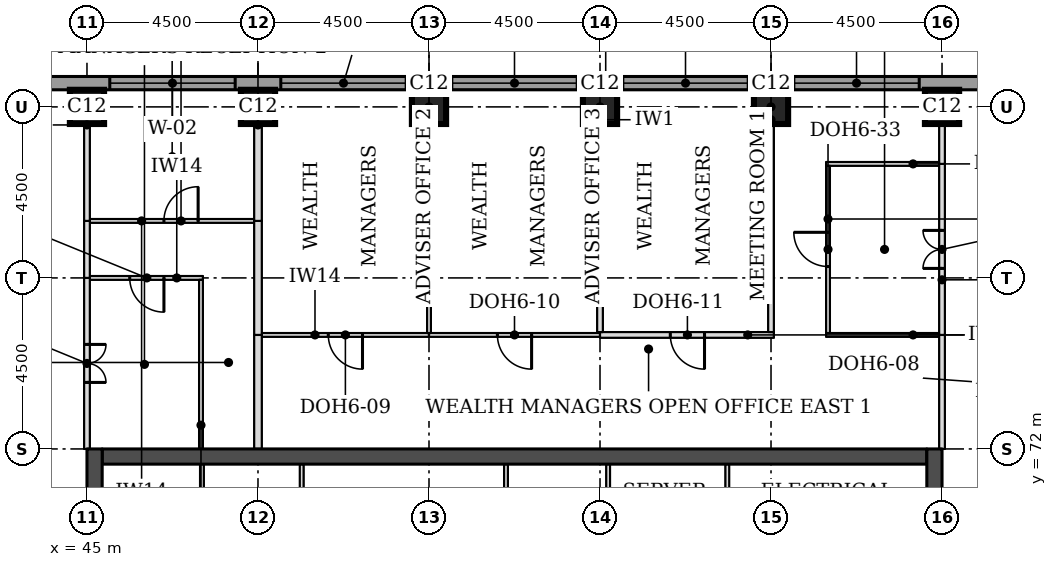
"""IFC4 building model, lengths in metres.
Left out: names, types, materials, properties, quantities, classifications, styles, units other than length and angle.
Written with IfcOpenShell. Run it as: python <this file> out.ifc"""

import sys

from ifc_helpers import new_model, si_unit, direction, frame, frame_2d, origin, origin_2d, place, context, subcontext, project, spatial, rectangle, extrude, element, fill, save


model = new_model("IFC4")
c1 = context("Model", 3, precision=1e-05, world=origin(), true_north=direction((0.0, 1.0)))
c2 = subcontext(c1, "Body", "Model", "MODEL_VIEW")
j1 = project(units=[si_unit("LENGTHUNIT", "METRE"), si_unit("PLANEANGLEUNIT", "RADIAN")], contexts=[c1])
p1 = place(None, origin())
s1 = spatial("IfcSite", under=j1, at=p1, CompositionType="ELEMENT")
p2 = place(p1, origin())
s2 = spatial("IfcBuilding", under=s1, at=p2, CompositionType="ELEMENT")
p3 = place(p2, frame((0.0, 0.0, 188.4)))
s3 = spatial("IfcBuildingStorey", under=s2, at=p3, CompositionType="ELEMENT", Elevation=188.4)
for number, where, z_axis, x_axis in (
    (1, (45.0, 81.0, 0.0), (0.0, 0.0, 1.0), (1.0, 0.0, 0.0)),
    (2, (49.5, 81.0, 0.0), (0.0, 0.0, 1.0), (1.0, 0.0, 0.0)),
    (3, (54.0, 81.0, 0.0), (0.0, 0.0, 1.0), (1.0, 0.0, 0.0)),
    (4, (58.5, 81.0, 0.0), (0.0, 0.0, 1.0), (1.0, 0.0, 0.0)),
    (5, (63.0, 81.0, 0.0), (0.0, 0.0, 1.0), (1.0, 0.0, 0.0)),
    (6, (67.5, 81.0, 0.0), (0.0, 0.0, 1.0), (1.0, 0.0, 0.0)),
):
    element("IfcColumn", number, at=place(p3, frame(where, z_axis=z_axis, x_axis=x_axis)), inside=s3, PredefinedType="COLUMN", context=c2, shape_type="SweptSolid", body=[
        extrude(rectangle(XDim=0.9, YDim=0.9, at=origin_2d()), origin(), (0.0, 0.0, 1.0), 3.7),
    ])
p4 = place(p3, frame((45.4, 71.8, 0.0), z_axis=(0.0, 0.0, 1.0), x_axis=(1.0, 0.0, 0.0)))
e7 = element("IfcWall", 7, at=p4, inside=s3, PredefinedType="SHEAR", context=c2, shape_type="SweptSolid", body=[
    extrude(rectangle(XDim=21.7, YDim=0.4, at=frame_2d((10.85, 0.0))), origin(), (0.0, 0.0, 1.0), 3.7),
])
p5 = place(p3, frame((45.2, 49.5, 0.0), z_axis=(0.0, 0.0, 1.0), x_axis=(0.0, 1.0, 0.0)))
e8 = element("IfcWall", 8, at=p5, inside=s3, PredefinedType="SHEAR", context=c2, shape_type="SweptSolid", body=[
    extrude(rectangle(XDim=22.5, YDim=0.4, at=frame_2d((11.25, 0.0))), origin(), (0.0, 0.0, 1.0), 3.7),
])
p6 = place(p5, frame((4.2, 0.0, 0.0)))
e9 = element("IfcOpeningElement", 9, at=p6, cuts=e8, PredefinedType="OPENING", context=c2, shape_type="SweptSolid", body=[
    extrude(rectangle(XDim=1.8, YDim=2.1, at=frame_2d((0.9, 1.05))), frame((0.0, 0.21, 0.0), z_axis=(0.0, -1.0, 0.0), x_axis=(1.0, 0.0, 0.0)), (0.0, 0.0, 1.0), 0.42),
])
p7 = place(p5, frame((6.9, 0.0, 0.0)))
e10 = element("IfcOpeningElement", 10, at=p7, cuts=e8, PredefinedType="OPENING", context=c2, shape_type="SweptSolid", body=[
    extrude(rectangle(XDim=1.1, YDim=2.1, at=frame_2d((0.55, 1.05))), frame((0.0, 0.21, 0.0), z_axis=(0.0, -1.0, 0.0), x_axis=(1.0, 0.0, 0.0)), (0.0, 0.0, 1.0), 0.42),
])
p8 = place(p5, frame((13.6, 0.0, 0.0)))
e11 = element("IfcOpeningElement", 11, at=p8, cuts=e8, PredefinedType="OPENING", context=c2, shape_type="SweptSolid", body=[
    extrude(rectangle(XDim=1.1, YDim=2.1, at=frame_2d((0.55, 1.05))), frame((0.0, 0.21, 0.0), z_axis=(0.0, -1.0, 0.0), x_axis=(1.0, 0.0, 0.0)), (0.0, 0.0, 1.0), 0.42),
])
p9 = place(p5, frame((16.5, 0.0, 0.0)))
e12 = element("IfcOpeningElement", 12, at=p9, cuts=e8, PredefinedType="OPENING", context=c2, shape_type="SweptSolid", body=[
    extrude(rectangle(XDim=1.8, YDim=2.1, at=frame_2d((0.9, 1.05))), frame((0.0, 0.21, 0.0), z_axis=(0.0, -1.0, 0.0), x_axis=(1.0, 0.0, 0.0)), (0.0, 0.0, 1.0), 0.42),
])
p10 = place(p3, frame((67.3, 49.5, 0.0), z_axis=(0.0, 0.0, 1.0), x_axis=(0.0, 1.0, 0.0)))
e13 = element("IfcWall", 13, at=p10, inside=s3, PredefinedType="SHEAR", context=c2, shape_type="SweptSolid", body=[
    extrude(rectangle(XDim=22.5, YDim=0.4, at=frame_2d((11.25, 0.0))), origin(), (0.0, 0.0, 1.0), 3.7),
])
p11 = place(p10, frame((4.2, 0.0, 0.0)))
e14 = element("IfcOpeningElement", 14, at=p11, cuts=e13, PredefinedType="OPENING", context=c2, shape_type="SweptSolid", body=[
    extrude(rectangle(XDim=1.8, YDim=2.1, at=frame_2d((0.9, 1.05))), frame((0.0, 0.21, 0.0), z_axis=(0.0, -1.0, 0.0), x_axis=(1.0, 0.0, 0.0)), (0.0, 0.0, 1.0), 0.42),
])
p12 = place(p10, frame((6.9, 0.0, 0.0)))
e15 = element("IfcOpeningElement", 15, at=p12, cuts=e13, PredefinedType="OPENING", context=c2, shape_type="SweptSolid", body=[
    extrude(rectangle(XDim=1.1, YDim=2.1, at=frame_2d((0.55, 1.05))), frame((0.0, 0.21, 0.0), z_axis=(0.0, -1.0, 0.0), x_axis=(1.0, 0.0, 0.0)), (0.0, 0.0, 1.0), 0.42),
])
p13 = place(p10, frame((13.6, 0.0, 0.0)))
e16 = element("IfcOpeningElement", 16, at=p13, cuts=e13, PredefinedType="OPENING", context=c2, shape_type="SweptSolid", body=[
    extrude(rectangle(XDim=1.1, YDim=2.1, at=frame_2d((0.55, 1.05))), frame((0.0, 0.21, 0.0), z_axis=(0.0, -1.0, 0.0), x_axis=(1.0, 0.0, 0.0)), (0.0, 0.0, 1.0), 0.42),
])
p14 = place(p10, frame((16.5, 0.0, 0.0)))
e17 = element("IfcOpeningElement", 17, at=p14, cuts=e13, PredefinedType="OPENING", context=c2, shape_type="SweptSolid", body=[
    extrude(rectangle(XDim=1.8, YDim=2.1, at=frame_2d((0.9, 1.05))), frame((0.0, 0.21, 0.0), z_axis=(0.0, -1.0, 0.0), x_axis=(1.0, 0.0, 0.0)), (0.0, 0.0, 1.0), 0.42),
])
p15 = place(p3, frame((72.331, 81.625, 0.0), z_axis=(0.0, 0.0, 1.0), x_axis=(-1.0, 0.0, 0.0)))
e18 = element("IfcWall", 18, at=p15, inside=s3, PredefinedType="STANDARD", context=c2, shape_type="SweptSolid", body=[
    extrude(rectangle(XDim=32.163, YDim=0.35, at=frame_2d((16.081, 0.0))), origin(), (0.0, 0.0, 1.0), 3.525),
])
p16 = place(p15, frame((5.431, 0.0, 0.9)))
e19 = element("IfcOpeningElement", 19, at=p16, cuts=e18, PredefinedType="OPENING", context=c2, shape_type="SweptSolid", body=[
    extrude(rectangle(XDim=3.3, YDim=1.9, at=frame_2d((1.65, 0.95))), frame((0.0, 0.185, 0.0), z_axis=(0.0, -1.0, 0.0), x_axis=(1.0, 0.0, 0.0)), (0.0, 0.0, 1.0), 0.37),
])
p17 = place(p15, frame((9.931, 0.0, 0.9)))
e20 = element("IfcOpeningElement", 20, at=p17, cuts=e18, PredefinedType="OPENING", context=c2, shape_type="SweptSolid", body=[
    extrude(rectangle(XDim=3.3, YDim=1.9, at=frame_2d((1.65, 0.95))), frame((0.0, 0.185, 0.0), z_axis=(0.0, -1.0, 0.0), x_axis=(1.0, 0.0, 0.0)), (0.0, 0.0, 1.0), 0.37),
])
p18 = place(p15, frame((14.431, 0.0, 0.9)))
e21 = element("IfcOpeningElement", 21, at=p18, cuts=e18, PredefinedType="OPENING", context=c2, shape_type="SweptSolid", body=[
    extrude(rectangle(XDim=3.3, YDim=1.9, at=frame_2d((1.65, 0.95))), frame((0.0, 0.185, 0.0), z_axis=(0.0, -1.0, 0.0), x_axis=(1.0, 0.0, 0.0)), (0.0, 0.0, 1.0), 0.37),
])
p19 = place(p15, frame((18.931, 0.0, 0.9)))
e22 = element("IfcOpeningElement", 22, at=p19, cuts=e18, PredefinedType="OPENING", context=c2, shape_type="SweptSolid", body=[
    extrude(rectangle(XDim=3.3, YDim=1.9, at=frame_2d((1.65, 0.95))), frame((0.0, 0.185, 0.0), z_axis=(0.0, -1.0, 0.0), x_axis=(1.0, 0.0, 0.0)), (0.0, 0.0, 1.0), 0.37),
])
p20 = place(p15, frame((23.431, 0.0, 0.9)))
e23 = element("IfcOpeningElement", 23, at=p20, cuts=e18, PredefinedType="OPENING", context=c2, shape_type="SweptSolid", body=[
    extrude(rectangle(XDim=3.3, YDim=1.9, at=frame_2d((1.65, 0.95))), frame((0.0, 0.185, 0.0), z_axis=(0.0, -1.0, 0.0), x_axis=(1.0, 0.0, 0.0)), (0.0, 0.0, 1.0), 0.37),
])
p21 = place(p3, frame((49.6, 75.0, 0.0), z_axis=(0.0, 0.0, 1.0), x_axis=(1.0, 0.0, 0.0)))
e24 = element("IfcWall", 24, at=p21, inside=s3, PredefinedType="PARTITIONING", context=c2, shape_type="SweptSolid", body=[
    extrude(rectangle(XDim=4.4, YDim=0.1, at=frame_2d((2.2, 0.0))), origin(), (0.0, 0.0, 1.0), 3.55),
])
p22 = place(p21, frame((1.75, 0.0, 0.0)))
e25 = element("IfcOpeningElement", 25, at=p22, cuts=e24, PredefinedType="OPENING", context=c2, shape_type="SweptSolid", body=[
    extrude(rectangle(XDim=0.9, YDim=2.1, at=frame_2d((0.45, 1.05))), frame((0.0, 0.06, 0.0), z_axis=(0.0, -1.0, 0.0), x_axis=(1.0, 0.0, 0.0)), (0.0, 0.0, 1.0), 0.12),
])
p23 = place(p3, frame((54.0, 75.0, 0.0), z_axis=(0.0, 0.0, 1.0), x_axis=(1.0, 0.0, 0.0)))
e26 = element("IfcWall", 26, at=p23, inside=s3, PredefinedType="PARTITIONING", context=c2, shape_type="SweptSolid", body=[
    extrude(rectangle(XDim=4.5, YDim=0.1, at=frame_2d((2.25, 0.0))), origin(), (0.0, 0.0, 1.0), 3.55),
])
p24 = place(p23, frame((1.8, 0.0, 0.0)))
e27 = element("IfcOpeningElement", 27, at=p24, cuts=e26, PredefinedType="OPENING", context=c2, shape_type="SweptSolid", body=[
    extrude(rectangle(XDim=0.9, YDim=2.1, at=frame_2d((0.45, 1.05))), frame((0.0, 0.06, 0.0), z_axis=(0.0, -1.0, 0.0), x_axis=(1.0, 0.0, 0.0)), (0.0, 0.0, 1.0), 0.12),
])
p25 = place(p3, frame((58.5, 75.0, 0.0), z_axis=(0.0, 0.0, 1.0), x_axis=(1.0, 0.0, 0.0)))
e28 = element("IfcWall", 28, at=p25, inside=s3, PredefinedType="PARTITIONING", context=c2, shape_type="SweptSolid", body=[
    extrude(rectangle(XDim=4.575, YDim=0.15, at=frame_2d((2.288, 0.0))), origin(), (0.0, 0.0, 1.0), 3.55),
])
p26 = place(p25, frame((1.85, 0.0, 0.0)))
e29 = element("IfcOpeningElement", 29, at=p26, cuts=e28, PredefinedType="OPENING", context=c2, shape_type="SweptSolid", body=[
    extrude(rectangle(XDim=0.9, YDim=2.1, at=frame_2d((0.45, 1.05))), frame((0.0, 0.085, 0.0), z_axis=(0.0, -1.0, 0.0), x_axis=(1.0, 0.0, 0.0)), (0.0, 0.0, 1.0), 0.17),
])
p27 = place(p3, frame((64.45, 75.0, 0.0), z_axis=(0.0, 0.0, 1.0), x_axis=(1.0, 0.0, 0.0)))
e30 = element("IfcWall", 30, at=p27, inside=s3, PredefinedType="PARTITIONING", context=c2, shape_type="SweptSolid", body=[
    extrude(rectangle(XDim=2.975, YDim=0.1, at=frame_2d((1.488, 0.0))), origin(), (0.0, 0.0, 1.0), 3.55),
])
p28 = place(p3, frame((45.075, 76.5, 0.0), z_axis=(0.0, 0.0, 1.0), x_axis=(1.0, 0.0, 0.0)))
e31 = element("IfcWall", 31, at=p28, inside=s3, PredefinedType="PARTITIONING", context=c2, shape_type="SweptSolid", body=[
    extrude(rectangle(XDim=2.975, YDim=0.1, at=frame_2d((1.488, 0.0))), origin(), (0.0, 0.0, 1.0), 3.55),
])
p29 = place(p28, frame((1.05, 0.0, 0.0)))
e32 = element("IfcOpeningElement", 32, at=p29, cuts=e31, PredefinedType="OPENING", context=c2, shape_type="SweptSolid", body=[
    extrude(rectangle(XDim=0.9, YDim=2.1, at=frame_2d((0.45, 1.05))), frame((0.0, 0.06, 0.0), z_axis=(0.0, -1.0, 0.0), x_axis=(1.0, 0.0, 0.0)), (0.0, 0.0, 1.0), 0.12),
])
p30 = place(p3, frame((45.075, 78.0, 0.0), z_axis=(0.0, 0.0, 1.0), x_axis=(1.0, 0.0, 0.0)))
e33 = element("IfcWall", 33, at=p30, inside=s3, PredefinedType="PARTITIONING", context=c2, shape_type="SweptSolid", body=[
    extrude(rectangle(XDim=4.325, YDim=0.1, at=frame_2d((2.163, 0.0))), origin(), (0.0, 0.0, 1.0), 3.55),
])
p31 = place(p30, frame((1.95, 0.0, 0.0)))
e34 = element("IfcOpeningElement", 34, at=p31, cuts=e33, PredefinedType="OPENING", context=c2, shape_type="SweptSolid", body=[
    extrude(rectangle(XDim=0.9, YDim=2.1, at=frame_2d((0.45, 1.05))), frame((0.0, 0.06, 0.0), z_axis=(0.0, -1.0, 0.0), x_axis=(1.0, 0.0, 0.0)), (0.0, 0.0, 1.0), 0.12),
])
p32 = place(p3, frame((64.45, 79.5, 0.0), z_axis=(0.0, 0.0, 1.0), x_axis=(1.0, 0.0, 0.0)))
e35 = element("IfcWall", 35, at=p32, inside=s3, PredefinedType="PARTITIONING", context=c2, shape_type="SweptSolid", body=[
    extrude(rectangle(XDim=2.975, YDim=0.1, at=frame_2d((1.488, 0.0))), origin(), (0.0, 0.0, 1.0), 3.55),
])
p33 = place(p3, frame((45.0, 72.0, 0.0), z_axis=(0.0, 0.0, 1.0), x_axis=(0.0, 1.0, 0.0)))
e36 = element("IfcWall", 36, at=p33, inside=s3, PredefinedType="PARTITIONING", context=c2, shape_type="SweptSolid", body=[
    extrude(rectangle(XDim=4.5, YDim=0.15, at=frame_2d((2.25, 0.0))), origin(), (0.0, 0.0, 1.0), 3.022),
])
p34 = place(p33, frame((1.75, 0.0, 0.0)))
e37 = element("IfcOpeningElement", 37, at=p34, cuts=e36, PredefinedType="OPENING", context=c2, shape_type="SweptSolid", body=[
    extrude(rectangle(XDim=1.0, YDim=2.1, at=frame_2d((0.5, 1.05))), frame((0.0, 0.085, 0.0), z_axis=(0.0, -1.0, 0.0), x_axis=(1.0, 0.0, 0.0)), (0.0, 0.0, 1.0), 0.17),
])
p35 = place(p3, frame((48.0, 72.0, 0.0), z_axis=(0.0, 0.0, 1.0), x_axis=(0.0, 1.0, 0.0)))
e38 = element("IfcWall", 38, at=p35, inside=s3, PredefinedType="PARTITIONING", context=c2, shape_type="SweptSolid", body=[
    extrude(rectangle(XDim=4.45, YDim=0.1, at=frame_2d((2.225, 0.0))), origin(), (0.0, 0.0, 1.0), 3.55),
])
p36 = place(p3, frame((49.5, 72.0, 0.0), z_axis=(0.0, 0.0, 1.0), x_axis=(0.0, 1.0, 0.0)))
e39 = element("IfcWall", 39, at=p36, inside=s3, PredefinedType="PARTITIONING", context=c2, shape_type="SweptSolid", body=[
    extrude(rectangle(XDim=3.0, YDim=0.2, at=frame_2d((1.5, 0.0))), origin(), (0.0, 0.0, 1.0), 3.55),
])
p37 = place(p3, frame((67.5, 72.0, 0.0), z_axis=(0.0, 0.0, 1.0), x_axis=(0.0, 1.0, 0.0)))
e40 = element("IfcWall", 40, at=p37, inside=s3, PredefinedType="PARTITIONING", context=c2, shape_type="SweptSolid", body=[
    extrude(rectangle(XDim=3.0, YDim=0.15, at=frame_2d((1.5, 0.0))), origin(), (0.0, 0.0, 1.0), 3.022),
])
p38 = place(p3, frame((49.5, 75.0, 0.0), z_axis=(0.0, 0.0, 1.0), x_axis=(0.0, 1.0, 0.0)))
e41 = element("IfcWall", 41, at=p38, inside=s3, PredefinedType="PARTITIONING", context=c2, shape_type="SweptSolid", body=[
    extrude(rectangle(XDim=3.0, YDim=0.2, at=frame_2d((1.5, 0.0))), origin(), (0.0, 0.0, 1.0), 3.55),
])
p39 = place(p3, frame((67.5, 75.0, 0.0), z_axis=(0.0, 0.0, 1.0), x_axis=(0.0, 1.0, 0.0)))
e42 = element("IfcWall", 42, at=p39, inside=s3, PredefinedType="PARTITIONING", context=c2, shape_type="SweptSolid", body=[
    extrude(rectangle(XDim=4.5, YDim=0.15, at=frame_2d((2.25, 0.0))), origin(), (0.0, 0.0, 1.0), 3.022),
])
p40 = place(p39, frame((1.75, 0.0, 0.0)))
e43 = element("IfcOpeningElement", 43, at=p40, cuts=e42, PredefinedType="OPENING", context=c2, shape_type="SweptSolid", body=[
    extrude(rectangle(XDim=1.0, YDim=2.1, at=frame_2d((0.5, 1.05))), frame((0.0, 0.085, 0.0), z_axis=(0.0, -1.0, 0.0), x_axis=(1.0, 0.0, 0.0)), (0.0, 0.0, 1.0), 0.17),
])
p41 = place(p3, frame((54.0, 75.05, 0.0), z_axis=(0.0, 0.0, 1.0), x_axis=(0.0, 1.0, 0.0)))
e44 = element("IfcWall", 44, at=p41, inside=s3, PredefinedType="PARTITIONING", context=c2, shape_type="SweptSolid", body=[
    extrude(rectangle(XDim=6.4, YDim=0.1, at=frame_2d((3.2, 0.0))), origin(), (0.0, 0.0, 1.0), 3.55),
])
p42 = place(p3, frame((64.5, 75.05, 0.0), z_axis=(0.0, 0.0, 1.0), x_axis=(0.0, 1.0, 0.0)))
e45 = element("IfcWall", 45, at=p42, inside=s3, PredefinedType="PARTITIONING", context=c2, shape_type="SweptSolid", body=[
    extrude(rectangle(XDim=4.4, YDim=0.1, at=frame_2d((2.2, 0.0))), origin(), (0.0, 0.0, 1.0), 3.55),
])
p43 = place(p42, frame((1.75, 0.0, 0.0)))
e46 = element("IfcOpeningElement", 46, at=p43, cuts=e45, PredefinedType="OPENING", context=c2, shape_type="SweptSolid", body=[
    extrude(rectangle(XDim=0.9, YDim=2.1, at=frame_2d((0.45, 1.05))), frame((0.0, 0.06, 0.0), z_axis=(0.0, -1.0, 0.0), x_axis=(1.0, 0.0, 0.0)), (0.0, 0.0, 1.0), 0.12),
])
for number, where, z_axis, x_axis in (
    (47, (58.5, 75.075, 0.0), (0.0, 0.0, 1.0), (0.0, 1.0, 0.0)),
    (48, (63.0, 75.075, 0.0), (0.0, 0.0, 1.0), (0.0, 1.0, 0.0)),
):
    element("IfcWall", number, at=place(p3, frame(where, z_axis=z_axis, x_axis=x_axis)), inside=s3, PredefinedType="PARTITIONING", context=c2, shape_type="SweptSolid", body=[
        extrude(rectangle(XDim=6.375, YDim=0.15, at=frame_2d((3.188, 0.0))), origin(), (0.0, 0.0, 1.0), 3.55),
    ])
p44 = place(p3, frame((45.0, 76.5, 0.0), z_axis=(0.0, 0.0, 1.0), x_axis=(0.0, 1.0, 0.0)))
e49 = element("IfcWall", 49, at=p44, inside=s3, PredefinedType="PARTITIONING", context=c2, shape_type="SweptSolid", body=[
    extrude(rectangle(XDim=1.5, YDim=0.15, at=frame_2d((0.75, 0.0))), origin(), (0.0, 0.0, 1.0), 3.022),
])
p45 = place(p3, frame((45.0, 78.0, 0.0), z_axis=(0.0, 0.0, 1.0), x_axis=(0.0, 1.0, 0.0)))
e50 = element("IfcWall", 50, at=p45, inside=s3, PredefinedType="PARTITIONING", context=c2, shape_type="SweptSolid", body=[
    extrude(rectangle(XDim=3.45, YDim=0.15, at=frame_2d((1.725, 0.0))), origin(), (0.0, 0.0, 1.0), 3.022),
])
p46 = place(p3, frame((49.5, 78.0, 0.0), z_axis=(0.0, 0.0, 1.0), x_axis=(0.0, 1.0, 0.0)))
e51 = element("IfcWall", 51, at=p46, inside=s3, PredefinedType="PARTITIONING", context=c2, shape_type="SweptSolid", body=[
    extrude(rectangle(XDim=3.45, YDim=0.2, at=frame_2d((1.725, 0.0))), origin(), (0.0, 0.0, 1.0), 3.55),
])
p47 = place(p3, frame((67.5, 79.5, 0.0), z_axis=(0.0, 0.0, 1.0), x_axis=(0.0, 1.0, 0.0)))
e52 = element("IfcWall", 52, at=p47, inside=s3, PredefinedType="PARTITIONING", context=c2, shape_type="SweptSolid", body=[
    extrude(rectangle(XDim=1.95, YDim=0.15, at=frame_2d((0.975, 0.0))), origin(), (0.0, 0.0, 1.0), 3.022),
])
for number, where, z_axis, x_axis in (
    (53, (48.025, 68.5, 0.0), (0.0, 0.0, 1.0), (0.0, 1.0, 0.0)),
    (54, (50.65, 68.5, 0.0), (0.0, 0.0, 1.0), (0.0, 1.0, 0.0)),
    (55, (56.026, 68.5, 0.0), (0.0, 0.0, 1.0), (0.0, 1.0, 0.0)),
    (56, (58.714, 68.5, 0.0), (0.0, 0.0, 1.0), (0.0, 1.0, 0.0)),
    (57, (61.85, 68.5, 0.0), (0.0, 0.0, 1.0), (0.0, 1.0, 0.0)),
):
    element("IfcWall", number, at=place(p3, frame(where, z_axis=z_axis, x_axis=x_axis)), inside=s3, PredefinedType="PARTITIONING", context=c2, shape_type="SweptSolid", body=[
        extrude(rectangle(XDim=3.1, YDim=0.1, at=frame_2d((1.55, 0.0))), origin(), (0.0, 0.0, 1.0), 3.55),
    ])
p48 = place(p16, origin())
e58 = element("IfcWindow", 58, at=p48, inside=s3, PartitioningType="SINGLE_PANEL", PredefinedType="WINDOW", context=c2, shape_type="SweptSolid", body=[
    extrude(rectangle(XDim=3.3, YDim=1.9, at=frame_2d((1.65, 0.95))), frame((0.0, 0.085, 0.0), z_axis=(0.0, -1.0, 0.0), x_axis=(1.0, 0.0, 0.0)), (0.0, 0.0, 1.0), 0.06),
])
fill(e19, e58)
p49 = place(p17, origin())
e59 = element("IfcWindow", 59, at=p49, inside=s3, PartitioningType="SINGLE_PANEL", PredefinedType="WINDOW", context=c2, shape_type="SweptSolid", body=[
    extrude(rectangle(XDim=3.3, YDim=1.9, at=frame_2d((1.65, 0.95))), frame((0.0, 0.085, 0.0), z_axis=(0.0, -1.0, 0.0), x_axis=(1.0, 0.0, 0.0)), (0.0, 0.0, 1.0), 0.06),
])
fill(e20, e59)
p50 = place(p18, origin())
e60 = element("IfcWindow", 60, at=p50, inside=s3, PartitioningType="SINGLE_PANEL", PredefinedType="WINDOW", context=c2, shape_type="SweptSolid", body=[
    extrude(rectangle(XDim=3.3, YDim=1.9, at=frame_2d((1.65, 0.95))), frame((0.0, 0.085, 0.0), z_axis=(0.0, -1.0, 0.0), x_axis=(1.0, 0.0, 0.0)), (0.0, 0.0, 1.0), 0.06),
])
fill(e21, e60)
p51 = place(p19, origin())
e61 = element("IfcWindow", 61, at=p51, inside=s3, PartitioningType="SINGLE_PANEL", PredefinedType="WINDOW", context=c2, shape_type="SweptSolid", body=[
    extrude(rectangle(XDim=3.3, YDim=1.9, at=frame_2d((1.65, 0.95))), frame((0.0, 0.085, 0.0), z_axis=(0.0, -1.0, 0.0), x_axis=(1.0, 0.0, 0.0)), (0.0, 0.0, 1.0), 0.06),
])
fill(e22, e61)
p52 = place(p20, origin())
e62 = element("IfcWindow", 62, at=p52, inside=s3, PartitioningType="SINGLE_PANEL", PredefinedType="WINDOW", context=c2, shape_type="SweptSolid", body=[
    extrude(rectangle(XDim=3.3, YDim=1.9, at=frame_2d((1.65, 0.95))), frame((0.0, 0.085, 0.0), z_axis=(0.0, -1.0, 0.0), x_axis=(1.0, 0.0, 0.0)), (0.0, 0.0, 1.0), 0.06),
])
fill(e23, e62)
p53 = place(p34, frame((1.0, 0.0, 0.0), z_axis=(0.0, 0.0, 1.0), x_axis=(-1.0, 0.0, 0.0)))
e63 = element("IfcDoor", 63, at=p53, inside=s3, OperationType="DOUBLE_DOOR_SINGLE_SWING", PredefinedType="DOOR", context=c2, shape_type="SweptSolid", body=[
    extrude(rectangle(XDim=1.0, YDim=2.1, at=frame_2d((0.5, 1.05))), frame((0.0, 0.025, 0.0), z_axis=(0.0, -1.0, 0.0), x_axis=(1.0, 0.0, 0.0)), (0.0, 0.0, 1.0), 0.05),
])
fill(e37, e63)
p54 = place(p29, frame((0.9, 0.0, 0.0), z_axis=(0.0, 0.0, 1.0), x_axis=(-1.0, 0.0, 0.0)))
e64 = element("IfcDoor", 64, at=p54, inside=s3, OperationType="SINGLE_SWING_LEFT", PredefinedType="DOOR", context=c2, shape_type="SweptSolid", body=[
    extrude(rectangle(XDim=0.9, YDim=2.1, at=frame_2d((0.45, 1.05))), frame((0.0, 0.025, 0.0), z_axis=(0.0, -1.0, 0.0), x_axis=(1.0, 0.0, 0.0)), (0.0, 0.0, 1.0), 0.05),
])
fill(e32, e64)
p55 = place(p31, origin())
e65 = element("IfcDoor", 65, at=p55, inside=s3, OperationType="SINGLE_SWING_RIGHT", PredefinedType="DOOR", context=c2, shape_type="SweptSolid", body=[
    extrude(rectangle(XDim=0.9, YDim=2.1, at=frame_2d((0.45, 1.05))), frame((0.0, 0.025, 0.0), z_axis=(0.0, -1.0, 0.0), x_axis=(1.0, 0.0, 0.0)), (0.0, 0.0, 1.0), 0.05),
])
fill(e34, e65)
p56 = place(p40, origin())
e66 = element("IfcDoor", 66, at=p56, inside=s3, OperationType="DOUBLE_DOOR_SINGLE_SWING", PredefinedType="DOOR", context=c2, shape_type="SweptSolid", body=[
    extrude(rectangle(XDim=1.0, YDim=2.1, at=frame_2d((0.5, 1.05))), frame((0.0, 0.025, 0.0), z_axis=(0.0, -1.0, 0.0), x_axis=(1.0, 0.0, 0.0)), (0.0, 0.0, 1.0), 0.05),
])
fill(e43, e66)
p57 = place(p43, origin())
e67 = element("IfcDoor", 67, at=p57, inside=s3, OperationType="SINGLE_SWING_RIGHT", PredefinedType="DOOR", context=c2, shape_type="SweptSolid", body=[
    extrude(rectangle(XDim=0.9, YDim=2.1, at=frame_2d((0.45, 1.05))), frame((0.0, 0.025, 0.0), z_axis=(0.0, -1.0, 0.0), x_axis=(1.0, 0.0, 0.0)), (0.0, 0.0, 1.0), 0.05),
])
fill(e46, e67)
p58 = place(p22, frame((0.9, 0.0, 0.0), z_axis=(0.0, 0.0, 1.0), x_axis=(-1.0, 0.0, 0.0)))
e68 = element("IfcDoor", 68, at=p58, inside=s3, OperationType="SINGLE_SWING_LEFT", PredefinedType="DOOR", context=c2, shape_type="SweptSolid", body=[
    extrude(rectangle(XDim=0.9, YDim=2.1, at=frame_2d((0.45, 1.05))), frame((0.0, 0.025, 0.0), z_axis=(0.0, -1.0, 0.0), x_axis=(1.0, 0.0, 0.0)), (0.0, 0.0, 1.0), 0.05),
])
fill(e25, e68)
p59 = place(p24, frame((0.9, 0.0, 0.0), z_axis=(0.0, 0.0, 1.0), x_axis=(-1.0, 0.0, 0.0)))
e69 = element("IfcDoor", 69, at=p59, inside=s3, OperationType="SINGLE_SWING_LEFT", PredefinedType="DOOR", context=c2, shape_type="SweptSolid", body=[
    extrude(rectangle(XDim=0.9, YDim=2.1, at=frame_2d((0.45, 1.05))), frame((0.0, 0.025, 0.0), z_axis=(0.0, -1.0, 0.0), x_axis=(1.0, 0.0, 0.0)), (0.0, 0.0, 1.0), 0.05),
])
fill(e27, e69)
p60 = place(p26, frame((0.9, 0.0, 0.0), z_axis=(0.0, 0.0, 1.0), x_axis=(-1.0, 0.0, 0.0)))
e70 = element("IfcDoor", 70, at=p60, inside=s3, OperationType="SINGLE_SWING_LEFT", PredefinedType="DOOR", context=c2, shape_type="SweptSolid", body=[
    extrude(rectangle(XDim=0.9, YDim=2.1, at=frame_2d((0.45, 1.05))), frame((0.0, 0.025, 0.0), z_axis=(0.0, -1.0, 0.0), x_axis=(1.0, 0.0, 0.0)), (0.0, 0.0, 1.0), 0.05),
])
fill(e29, e70)
save(model, sys.argv[1])
